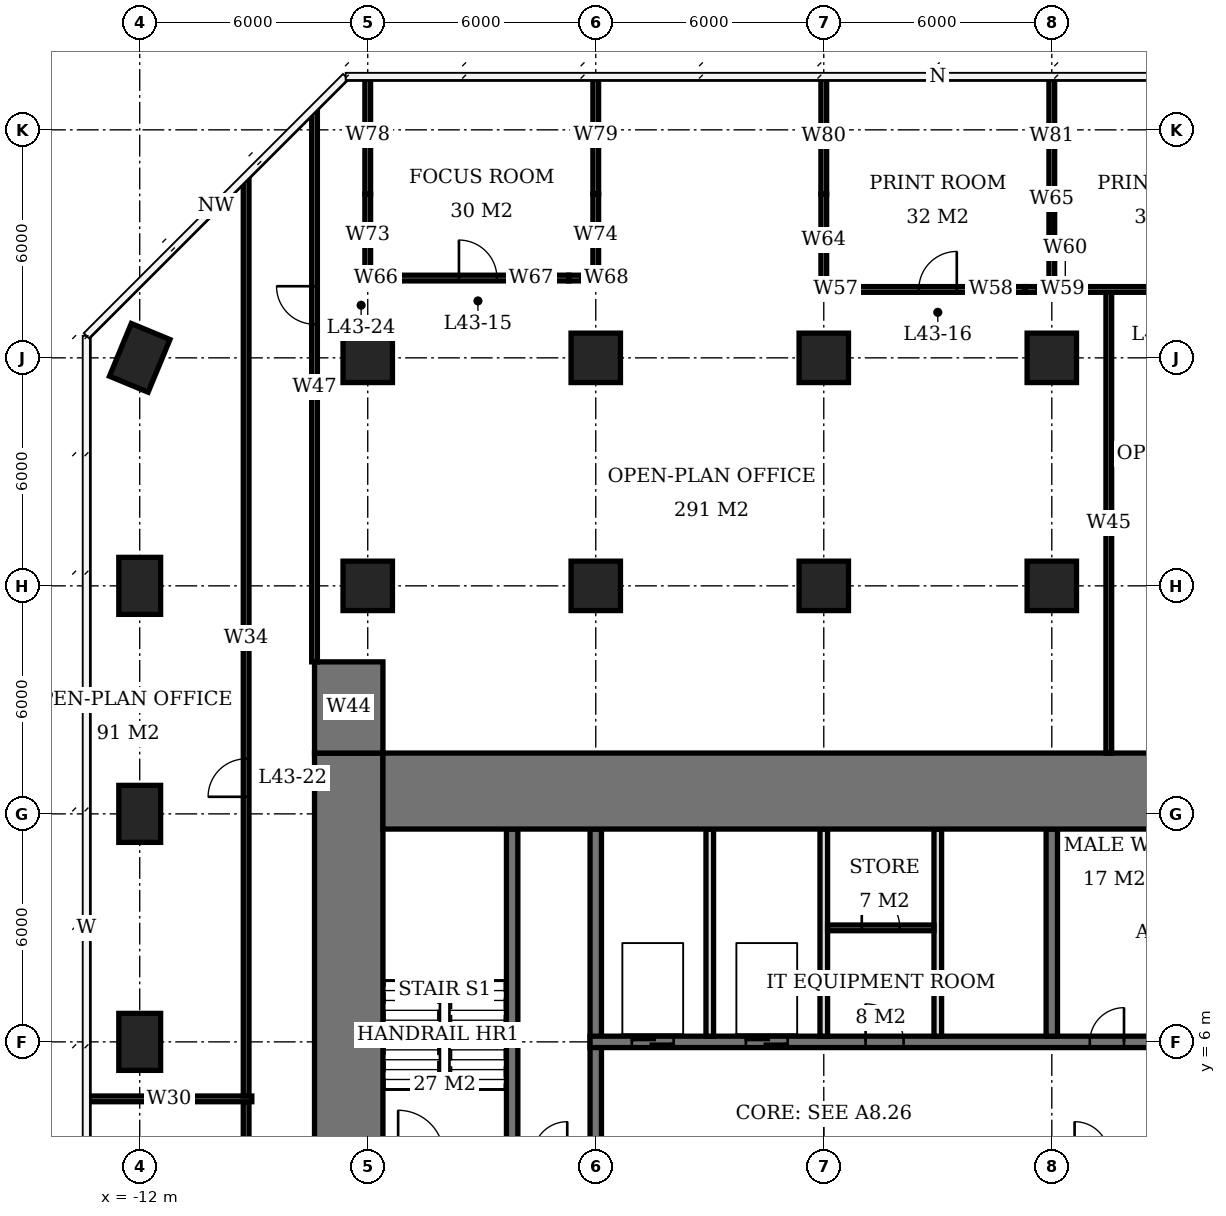
"""IFC4 building model, lengths in metres.
Left out: names, types, materials, properties, quantities, classifications, styles, units other than length and angle.
Written with IfcOpenShell. Run it as: python <this file> out.ifc"""

import sys

from ifc_helpers import new_model, si_unit, direction, frame, frame_2d, origin, origin_2d, place, context, subcontext, project, spatial, rectangle, extrude, element, fill, save


model = new_model("IFC4")
c1 = context("Model", 3, precision=1e-05, world=origin(), true_north=direction((0.0, 1.0)))
c2 = subcontext(c1, "Body", "Model", "MODEL_VIEW")
j1 = project(units=[si_unit("LENGTHUNIT", "METRE"), si_unit("PLANEANGLEUNIT", "RADIAN")], contexts=[c1])
p1 = place(None, origin())
s1 = spatial("IfcSite", under=j1, at=p1, CompositionType="ELEMENT")
p2 = place(p1, origin())
s2 = spatial("IfcBuilding", under=s1, at=p2, CompositionType="ELEMENT")
p3 = place(p2, frame((0.0, 0.0, 177.2)))
s3 = spatial("IfcBuildingStorey", under=s2, at=p3, CompositionType="ELEMENT", Elevation=177.2)
for number, where, z_axis, x_axis in (
    (1, (-12.0, 6.0, 0.0), (0.0, 0.0, 1.0), (0.0, 1.0, 0.0)),
    (2, (-12.0, 12.0, 0.0), (0.0, 0.0, 1.0), (0.0, 1.0, 0.0)),
    (3, (-12.0, 18.0, 0.0), (0.0, 0.0, 1.0), (0.0, 1.0, 0.0)),
    (4, (-12.0, 24.0, 0.0), (0.0, 0.0, 1.0), (0.383, 0.924, 0.0)),
):
    element("IfcColumn", number, at=place(p3, frame(where, z_axis=z_axis, x_axis=x_axis)), inside=s3, PredefinedType="COLUMN", context=c2, shape_type="SweptSolid", body=[
        extrude(rectangle(XDim=1.5, YDim=1.1, at=origin_2d()), origin(), (0.0, 0.0, 1.0), 3.9),
    ])
for number, where, z_axis, x_axis in (
    (5, (-6.0, 18.0, 0.0), (0.0, 0.0, 1.0), (1.0, 0.0, 0.0)),
    (6, (-6.0, 24.0, 0.0), (0.0, 0.0, 1.0), (1.0, 0.0, 0.0)),
    (7, (0.0, 18.0, 0.0), (0.0, 0.0, 1.0), (1.0, 0.0, 0.0)),
    (8, (0.0, 24.0, 0.0), (0.0, 0.0, 1.0), (1.0, 0.0, 0.0)),
    (9, (6.0, 18.0, 0.0), (0.0, 0.0, 1.0), (1.0, 0.0, 0.0)),
    (10, (6.0, 24.0, 0.0), (0.0, 0.0, 1.0), (1.0, 0.0, 0.0)),
    (11, (12.0, 18.0, 0.0), (0.0, 0.0, 1.0), (1.0, 0.0, 0.0)),
    (12, (12.0, 24.0, 0.0), (0.0, 0.0, 1.0), (1.0, 0.0, 0.0)),
):
    element("IfcColumn", number, at=place(p3, frame(where, z_axis=z_axis, x_axis=x_axis)), inside=s3, PredefinedType="COLUMN", context=c2, shape_type="SweptSolid", body=[
        extrude(rectangle(XDim=1.3, YDim=1.3, at=origin_2d()), origin(), (0.0, 0.0, 1.0), 3.9),
    ])
p4 = place(p3, frame((-5.6, 12.6, 0.0), z_axis=(0.0, 0.0, 1.0), x_axis=(1.0, 0.0, 0.0)))
e13 = element("IfcWall", 13, at=p4, inside=s3, PredefinedType="SHEAR", context=c2, shape_type="SweptSolid", body=[
    extrude(rectangle(XDim=23.2, YDim=2.0, at=frame_2d((11.6, 0.0))), origin(), (0.0, 0.0, 1.0), 3.9),
])
p5 = place(p3, frame((-6.5, -7.6, 0.0), z_axis=(0.0, 0.0, 1.0), x_axis=(0.0, 1.0, 0.0)))
e14 = element("IfcWall", 14, at=p5, inside=s3, PredefinedType="SHEAR", context=c2, shape_type="SweptSolid", body=[
    extrude(rectangle(XDim=21.2, YDim=1.8, at=frame_2d((10.6, 0.0))), origin(), (0.0, 0.0, 1.0), 3.9),
])
p6 = place(p5, frame((7.8, 0.0, 0.0)))
e15 = element("IfcOpeningElement", 15, at=p6, cuts=e14, PredefinedType="OPENING", context=c2, shape_type="SweptSolid", body=[
    extrude(rectangle(XDim=1.8, YDim=2.4, at=frame_2d((0.9, 1.2))), frame((0.0, 0.91, 0.0), z_axis=(0.0, -1.0, 0.0), x_axis=(1.0, 0.0, 0.0)), (0.0, 0.0, 1.0), 1.82),
])
p7 = place(p3, frame((-6.5, 13.6, 0.0), z_axis=(0.0, 0.0, 1.0), x_axis=(0.0, 1.0, 0.0)))
e16 = element("IfcWall", 16, at=p7, inside=s3, PredefinedType="SHEAR", context=c2, shape_type="SweptSolid", body=[
    extrude(rectangle(XDim=2.4, YDim=1.8, at=frame_2d((1.2, 0.0))), origin(), (0.0, 0.0, 1.0), 3.9),
])
p8 = place(p3, frame((-0.15, 6.0, 0.0), z_axis=(0.0, 0.0, 1.0), x_axis=(1.0, 0.0, 0.0)))
e17 = element("IfcWall", 17, at=p8, inside=s3, PredefinedType="SHEAR", context=c2, shape_type="SweptSolid", body=[
    extrude(rectangle(XDim=17.75, YDim=0.3, at=frame_2d((8.875, 0.0))), origin(), (0.0, 0.0, 1.0), 3.9),
])
p9 = place(p8, frame((13.15, 0.0, 0.0)))
e18 = element("IfcOpeningElement", 18, at=p9, cuts=e17, PredefinedType="OPENING", context=c2, shape_type="SweptSolid", body=[
    extrude(rectangle(XDim=0.9, YDim=2.1, at=frame_2d((0.45, 1.05))), frame((0.0, 0.16, 0.0), z_axis=(0.0, -1.0, 0.0), x_axis=(1.0, 0.0, 0.0)), (0.0, 0.0, 1.0), 0.32),
])
p10 = place(p8, frame((16.25, 0.0, 0.0)))
e19 = element("IfcOpeningElement", 19, at=p10, cuts=e17, PredefinedType="OPENING", context=c2, shape_type="SweptSolid", body=[
    extrude(rectangle(XDim=1.0, YDim=2.1, at=frame_2d((0.5, 1.05))), frame((0.0, 0.16, 0.0), z_axis=(0.0, -1.0, 0.0), x_axis=(1.0, 0.0, 0.0)), (0.0, 0.0, 1.0), 0.32),
])
p11 = place(p8, frame((7.25, 0.0, 0.0)))
e20 = element("IfcOpeningElement", 20, at=p11, cuts=e17, PredefinedType="OPENING", context=c2, shape_type="SweptSolid", body=[
    extrude(rectangle(XDim=1.0, YDim=2.1, at=frame_2d((0.5, 1.05))), frame((0.0, 0.16, 0.0), z_axis=(0.0, -1.0, 0.0), x_axis=(1.0, 0.0, 0.0)), (0.0, 0.0, 1.0), 0.32),
])
p12 = place(p8, frame((1.1, 0.0, 0.0)))
e21 = element("IfcOpeningElement", 21, at=p12, cuts=e17, PredefinedType="OPENING", context=c2, shape_type="SweptSolid", body=[
    extrude(rectangle(XDim=1.1, YDim=2.1, at=frame_2d((0.55, 1.05))), frame((0.0, 0.16, 0.0), z_axis=(0.0, -1.0, 0.0), x_axis=(1.0, 0.0, 0.0)), (0.0, 0.0, 1.0), 0.32),
])
p13 = place(p8, frame((4.1, 0.0, 0.0)))
e22 = element("IfcOpeningElement", 22, at=p13, cuts=e17, PredefinedType="OPENING", context=c2, shape_type="SweptSolid", body=[
    extrude(rectangle(XDim=1.1, YDim=2.1, at=frame_2d((0.55, 1.05))), frame((0.0, 0.16, 0.0), z_axis=(0.0, -1.0, 0.0), x_axis=(1.0, 0.0, 0.0)), (0.0, 0.0, 1.0), 0.32),
])
p14 = place(p3, frame((0.0, 3.15, 0.0), z_axis=(0.0, 0.0, 1.0), x_axis=(0.0, 1.0, 0.0)))
e23 = element("IfcWall", 23, at=p14, inside=s3, PredefinedType="SHEAR", context=c2, shape_type="SweptSolid", body=[
    extrude(rectangle(XDim=8.45, YDim=0.3, at=frame_2d((4.225, 0.0))), origin(), (0.0, 0.0, 1.0), 3.9),
])
p15 = place(p3, frame((12.0, 6.15, 0.0), z_axis=(0.0, 0.0, 1.0), x_axis=(0.0, 1.0, 0.0)))
e24 = element("IfcWall", 24, at=p15, inside=s3, PredefinedType="SHEAR", context=c2, shape_type="SweptSolid", body=[
    extrude(rectangle(XDim=5.45, YDim=0.3, at=frame_2d((2.725, 0.0))), origin(), (0.0, 0.0, 1.0), 3.9),
])
p16 = place(p3, frame((-2.2, 3.15, 0.0), z_axis=(0.0, 0.0, 1.0), x_axis=(0.0, 1.0, 0.0)))
e25 = element("IfcWall", 25, at=p16, inside=s3, PredefinedType="SHEAR", context=c2, shape_type="SweptSolid", body=[
    extrude(rectangle(XDim=8.45, YDim=0.3, at=frame_2d((4.225, 0.0))), origin(), (0.0, 0.0, 1.0), 3.9),
])
for number, where, z_axis, x_axis in (
    (26, (3.0, 6.15, 0.0), (0.0, 0.0, 1.0), (0.0, 1.0, 0.0)),
    (27, (6.0, 6.15, 0.0), (0.0, 0.0, 1.0), (0.0, 1.0, 0.0)),
    (28, (9.0, 6.15, 0.0), (0.0, 0.0, 1.0), (0.0, 1.0, 0.0)),
):
    element("IfcWall", number, at=place(p3, frame(where, z_axis=z_axis, x_axis=x_axis)), inside=s3, PredefinedType="SOLIDWALL", context=c2, shape_type="SweptSolid", body=[
        extrude(rectangle(XDim=5.45, YDim=0.2, at=frame_2d((2.725, 0.0))), origin(), (0.0, 0.0, 1.0), 3.9),
    ])
p17 = place(p3, frame((6.1, 9.0, 0.0), z_axis=(0.0, 0.0, 1.0), x_axis=(1.0, 0.0, 0.0)))
e29 = element("IfcWall", 29, at=p17, inside=s3, PredefinedType="PARTITIONING", context=c2, shape_type="SweptSolid", body=[
    extrude(rectangle(XDim=2.8, YDim=0.15, at=frame_2d((1.4, 0.0))), origin(), (0.0, 0.0, 1.0), 3.65),
])
p18 = place(p17, frame((0.9, 0.0, 0.0)))
e30 = element("IfcOpeningElement", 30, at=p18, cuts=e29, PredefinedType="OPENING", context=c2, shape_type="SweptSolid", body=[
    extrude(rectangle(XDim=1.0, YDim=2.1, at=frame_2d((0.5, 1.05))), frame((0.0, 0.085, 0.0), z_axis=(0.0, -1.0, 0.0), x_axis=(1.0, 0.0, 0.0)), (0.0, 0.0, 1.0), 0.17),
])
p19 = place(p3, frame((5.925, 25.8, 0.0), z_axis=(0.0, 0.0, 1.0), x_axis=(1.0, 0.0, 0.0)))
e31 = element("IfcWall", 31, at=p19, inside=s3, PredefinedType="PARTITIONING", context=c2, shape_type="SweptSolid", body=[
    extrude(rectangle(XDim=0.785, YDim=0.15, at=frame_2d((0.393, 0.0))), origin(), (0.0, 0.0, 1.0), 2.65),
])
p20 = place(p3, frame((6.71, 25.8, 0.0), z_axis=(0.0, 0.0, 1.0), x_axis=(1.0, 0.0, 0.0)))
e32 = element("IfcWall", 32, at=p20, inside=s3, PredefinedType="PARTITIONING", context=c2, shape_type="SweptSolid", body=[
    extrude(rectangle(XDim=4.58, YDim=0.15, at=frame_2d((2.29, 0.0))), origin(), (0.0, 0.0, 1.0), 3.65),
])
p21 = place(p20, frame((1.79, 0.0, 0.0)))
e33 = element("IfcOpeningElement", 33, at=p21, cuts=e32, PredefinedType="OPENING", context=c2, shape_type="SweptSolid", body=[
    extrude(rectangle(XDim=1.0, YDim=2.1, at=frame_2d((0.5, 1.05))), frame((0.0, 0.085, 0.0), z_axis=(0.0, -1.0, 0.0), x_axis=(1.0, 0.0, 0.0)), (0.0, 0.0, 1.0), 0.17),
])
p22 = place(p3, frame((11.29, 25.8, 0.0), z_axis=(0.0, 0.0, 1.0), x_axis=(1.0, 0.0, 0.0)))
e34 = element("IfcWall", 34, at=p22, inside=s3, PredefinedType="PARTITIONING", context=c2, shape_type="SweptSolid", body=[
    extrude(rectangle(XDim=0.785, YDim=0.15, at=frame_2d((0.393, 0.0))), origin(), (0.0, 0.0, 1.0), 2.65),
])
p23 = place(p3, frame((12.0, 25.8, 0.0), z_axis=(0.0, 0.0, 1.0), x_axis=(1.0, 0.0, 0.0)))
e35 = element("IfcWall", 35, at=p23, inside=s3, PredefinedType="PARTITIONING", context=c2, shape_type="SweptSolid", body=[
    extrude(rectangle(XDim=0.71, YDim=0.15, at=frame_2d((0.355, 0.0))), origin(), (0.0, 0.0, 1.0), 2.65),
])
p24 = place(p3, frame((12.71, 25.8, 0.0), z_axis=(0.0, 0.0, 1.0), x_axis=(1.0, 0.0, 0.0)))
e36 = element("IfcWall", 36, at=p24, inside=s3, PredefinedType="PARTITIONING", context=c2, shape_type="SweptSolid", body=[
    extrude(rectangle(XDim=4.58, YDim=0.15, at=frame_2d((2.29, 0.0))), origin(), (0.0, 0.0, 1.0), 3.65),
])
p25 = place(p24, frame((1.79, 0.0, 0.0)))
e37 = element("IfcOpeningElement", 37, at=p25, cuts=e36, PredefinedType="OPENING", context=c2, shape_type="SweptSolid", body=[
    extrude(rectangle(XDim=1.0, YDim=2.1, at=frame_2d((0.5, 1.05))), frame((0.0, 0.085, 0.0), z_axis=(0.0, -1.0, 0.0), x_axis=(1.0, 0.0, 0.0)), (0.0, 0.0, 1.0), 0.17),
])
p26 = place(p3, frame((-6.075, 26.1, 0.0), z_axis=(0.0, 0.0, 1.0), x_axis=(1.0, 0.0, 0.0)))
e38 = element("IfcWall", 38, at=p26, inside=s3, PredefinedType="PARTITIONING", context=c2, shape_type="SweptSolid", body=[
    extrude(rectangle(XDim=0.585, YDim=0.15, at=frame_2d((0.292, 0.0))), origin(), (0.0, 0.0, 1.0), 2.65),
])
p27 = place(p3, frame((-5.49, 26.1, 0.0), z_axis=(0.0, 0.0, 1.0), x_axis=(1.0, 0.0, 0.0)))
e39 = element("IfcWall", 39, at=p27, inside=s3, PredefinedType="PARTITIONING", context=c2, shape_type="SweptSolid", body=[
    extrude(rectangle(XDim=4.78, YDim=0.15, at=frame_2d((2.39, 0.0))), origin(), (0.0, 0.0, 1.0), 3.65),
])
p28 = place(p27, frame((1.89, 0.0, 0.0)))
e40 = element("IfcOpeningElement", 40, at=p28, cuts=e39, PredefinedType="OPENING", context=c2, shape_type="SweptSolid", body=[
    extrude(rectangle(XDim=1.0, YDim=2.1, at=frame_2d((0.5, 1.05))), frame((0.0, 0.085, 0.0), z_axis=(0.0, -1.0, 0.0), x_axis=(1.0, 0.0, 0.0)), (0.0, 0.0, 1.0), 0.17),
])
p29 = place(p3, frame((-0.71, 26.1, 0.0), z_axis=(0.0, 0.0, 1.0), x_axis=(1.0, 0.0, 0.0)))
e41 = element("IfcWall", 41, at=p29, inside=s3, PredefinedType="PARTITIONING", context=c2, shape_type="SweptSolid", body=[
    extrude(rectangle(XDim=0.785, YDim=0.15, at=frame_2d((0.393, 0.0))), origin(), (0.0, 0.0, 1.0), 2.65),
])
p30 = place(p3, frame((-6.0, 26.175, 0.0), z_axis=(0.0, 0.0, 1.0), x_axis=(0.0, 1.0, 0.0)))
e42 = element("IfcWall", 42, at=p30, inside=s3, PredefinedType="PARTITIONING", context=c2, shape_type="SweptSolid", body=[
    extrude(rectangle(XDim=2.135, YDim=0.15, at=frame_2d((1.067, 0.0))), origin(), (0.0, 0.0, 1.0), 2.65),
])
p31 = place(p3, frame((-6.0, 28.31, 0.0), z_axis=(0.0, 0.0, 1.0), x_axis=(0.0, 1.0, 0.0)))
e43 = element("IfcWall", 43, at=p31, inside=s3, PredefinedType="PARTITIONING", context=c2, shape_type="SweptSolid", body=[
    extrude(rectangle(XDim=3.09, YDim=0.15, at=frame_2d((1.545, 0.0))), origin(), (0.0, 0.0, 1.0), 3.65),
])
p32 = place(p3, frame((0.0, 26.175, 0.0), z_axis=(0.0, 0.0, 1.0), x_axis=(0.0, 1.0, 0.0)))
e44 = element("IfcWall", 44, at=p32, inside=s3, PredefinedType="PARTITIONING", context=c2, shape_type="SweptSolid", body=[
    extrude(rectangle(XDim=2.135, YDim=0.15, at=frame_2d((1.067, 0.0))), origin(), (0.0, 0.0, 1.0), 2.65),
])
p33 = place(p3, frame((0.0, 28.31, 0.0), z_axis=(0.0, 0.0, 1.0), x_axis=(0.0, 1.0, 0.0)))
e45 = element("IfcWall", 45, at=p33, inside=s3, PredefinedType="PARTITIONING", context=c2, shape_type="SweptSolid", body=[
    extrude(rectangle(XDim=3.09, YDim=0.15, at=frame_2d((1.545, 0.0))), origin(), (0.0, 0.0, 1.0), 3.65),
])
p34 = place(p3, frame((6.0, 25.875, 0.0), z_axis=(0.0, 0.0, 1.0), x_axis=(0.0, 1.0, 0.0)))
e46 = element("IfcWall", 46, at=p34, inside=s3, PredefinedType="PARTITIONING", context=c2, shape_type="SweptSolid", body=[
    extrude(rectangle(XDim=2.435, YDim=0.15, at=frame_2d((1.218, 0.0))), origin(), (0.0, 0.0, 1.0), 2.65),
])
p35 = place(p3, frame((6.0, 28.31, 0.0), z_axis=(0.0, 0.0, 1.0), x_axis=(0.0, 1.0, 0.0)))
e47 = element("IfcWall", 47, at=p35, inside=s3, PredefinedType="PARTITIONING", context=c2, shape_type="SweptSolid", body=[
    extrude(rectangle(XDim=3.04, YDim=0.15, at=frame_2d((1.52, 0.0))), origin(), (0.0, 0.0, 1.0), 3.65),
])
p36 = place(p3, frame((12.0, 25.875, 0.0), z_axis=(0.0, 0.0, 1.0), x_axis=(0.0, 1.0, 0.0)))
e48 = element("IfcWall", 48, at=p36, inside=s3, PredefinedType="PARTITIONING", context=c2, shape_type="SweptSolid", body=[
    extrude(rectangle(XDim=2.435, YDim=0.15, at=frame_2d((1.218, 0.0))), origin(), (0.0, 0.0, 1.0), 2.65),
])
p37 = place(p3, frame((12.0, 28.31, 0.0), z_axis=(0.0, 0.0, 1.0), x_axis=(0.0, 1.0, 0.0)))
e49 = element("IfcWall", 49, at=p37, inside=s3, PredefinedType="PARTITIONING", context=c2, shape_type="SweptSolid", body=[
    extrude(rectangle(XDim=3.04, YDim=0.15, at=frame_2d((1.52, 0.0))), origin(), (0.0, 0.0, 1.0), 3.65),
])
p38 = place(p3, frame((-13.4, 4.5, 0.0), z_axis=(0.0, 0.0, 1.0), x_axis=(1.0, 0.0, 0.0)))
e50 = element("IfcWall", 50, at=p38, inside=s3, PredefinedType="PARTITIONING", context=c2, shape_type="SweptSolid", body=[
    extrude(rectangle(XDim=4.35, YDim=0.15, at=frame_2d((2.175, 0.0))), origin(), (0.0, 0.0, 1.0), 3.65),
])
p39 = place(p3, frame((-9.2, -10.689, 0.0), z_axis=(0.0, 0.0, 1.0), x_axis=(0.0, 1.0, 0.0)))
e51 = element("IfcWall", 51, at=p39, inside=s3, PredefinedType="PARTITIONING", context=c2, shape_type="SweptSolid", body=[
    extrude(rectangle(XDim=15.114, YDim=0.15, at=frame_2d((7.557, 0.0))), origin(), (0.0, 0.0, 1.0), 3.65),
])
p40 = place(p39, frame((4.849, 0.0, 0.0)))
e52 = element("IfcOpeningElement", 52, at=p40, cuts=e51, PredefinedType="OPENING", context=c2, shape_type="SweptSolid", body=[
    extrude(rectangle(XDim=1.0, YDim=2.1, at=frame_2d((0.5, 1.05))), frame((0.0, 0.085, 0.0), z_axis=(0.0, -1.0, 0.0), x_axis=(1.0, 0.0, 0.0)), (0.0, 0.0, 1.0), 0.17),
])
p41 = place(p3, frame((-9.2, 4.575, 0.0), z_axis=(0.0, 0.0, 1.0), x_axis=(0.0, 1.0, 0.0)))
e53 = element("IfcWall", 53, at=p41, inside=s3, PredefinedType="PARTITIONING", context=c2, shape_type="SweptSolid", body=[
    extrude(rectangle(XDim=24.114, YDim=0.15, at=frame_2d((12.057, 0.0))), origin(), (0.0, 0.0, 1.0), 3.65),
])
p42 = place(p41, frame((7.874, 0.0, 0.0)))
e54 = element("IfcOpeningElement", 54, at=p42, cuts=e53, PredefinedType="OPENING", context=c2, shape_type="SweptSolid", body=[
    extrude(rectangle(XDim=1.0, YDim=2.1, at=frame_2d((0.5, 1.05))), frame((0.0, 0.085, 0.0), z_axis=(0.0, -1.0, 0.0), x_axis=(1.0, 0.0, 0.0)), (0.0, 0.0, 1.0), 0.17),
])
p43 = place(p3, frame((-7.4, 16.0, 0.0), z_axis=(0.0, 0.0, 1.0), x_axis=(0.0, 1.0, 0.0)))
e55 = element("IfcWall", 55, at=p43, inside=s3, PredefinedType="PARTITIONING", context=c2, shape_type="SweptSolid", body=[
    extrude(rectangle(XDim=14.489, YDim=0.15, at=frame_2d((7.245, 0.0))), origin(), (0.0, 0.0, 1.0), 3.65),
])
p44 = place(p43, frame((8.885, 0.0, 0.0)))
e56 = element("IfcOpeningElement", 56, at=p44, cuts=e55, PredefinedType="OPENING", context=c2, shape_type="SweptSolid", body=[
    extrude(rectangle(XDim=1.0, YDim=2.1, at=frame_2d((0.5, 1.05))), frame((0.0, 0.085, 0.0), z_axis=(0.0, -1.0, 0.0), x_axis=(1.0, 0.0, 0.0)), (0.0, 0.0, 1.0), 0.17),
])
p45 = place(p3, frame((13.5, 13.6, 0.0), z_axis=(0.0, 0.0, 1.0), x_axis=(0.0, 1.0, 0.0)))
e57 = element("IfcWall", 57, at=p45, inside=s3, PredefinedType="PARTITIONING", context=c2, shape_type="SweptSolid", body=[
    extrude(rectangle(XDim=12.125, YDim=0.15, at=frame_2d((6.062, 0.0))), origin(), (0.0, 0.0, 1.0), 3.65),
])
p46 = place(p9, origin())
e58 = element("IfcDoor", 58, at=p46, inside=s3, OperationType="SINGLE_SWING_RIGHT", PredefinedType="DOOR", context=c2, shape_type="SweptSolid", body=[
    extrude(rectangle(XDim=0.9, YDim=2.1, at=frame_2d((0.45, 1.05))), frame((0.0, 0.025, 0.0), z_axis=(0.0, -1.0, 0.0), x_axis=(1.0, 0.0, 0.0)), (0.0, 0.0, 1.0), 0.05),
])
fill(e18, e58)
p47 = place(p18, origin())
e59 = element("IfcDoor", 59, at=p47, inside=s3, OperationType="SINGLE_SWING_LEFT", PredefinedType="DOOR", context=c2, shape_type="SweptSolid", body=[
    extrude(rectangle(XDim=1.0, YDim=2.1, at=frame_2d((0.5, 1.05))), frame((0.0, 0.025, 0.0), z_axis=(0.0, -1.0, 0.0), x_axis=(1.0, 0.0, 0.0)), (0.0, 0.0, 1.0), 0.05),
])
fill(e30, e59)
p48 = place(p11, origin())
e60 = element("IfcDoor", 60, at=p48, inside=s3, OperationType="SINGLE_SWING_LEFT", PredefinedType="DOOR", context=c2, shape_type="SweptSolid", body=[
    extrude(rectangle(XDim=1.0, YDim=2.1, at=frame_2d((0.5, 1.05))), frame((0.0, 0.025, 0.0), z_axis=(0.0, -1.0, 0.0), x_axis=(1.0, 0.0, 0.0)), (0.0, 0.0, 1.0), 0.05),
])
fill(e20, e60)
p49 = place(p12, origin())
e61 = element("IfcDoor", 61, at=p49, inside=s3, OperationType="DOUBLE_DOOR_SLIDING", PredefinedType="USERDEFINED", context=c2, shape_type="SweptSolid", body=[
    extrude(rectangle(XDim=1.1, YDim=2.1, at=frame_2d((0.55, 1.05))), frame((0.0, 0.025, 0.0), z_axis=(0.0, -1.0, 0.0), x_axis=(1.0, 0.0, 0.0)), (0.0, 0.0, 1.0), 0.05),
])
fill(e21, e61)
p50 = place(p13, origin())
e62 = element("IfcDoor", 62, at=p50, inside=s3, OperationType="DOUBLE_DOOR_SLIDING", PredefinedType="USERDEFINED", context=c2, shape_type="SweptSolid", body=[
    extrude(rectangle(XDim=1.1, YDim=2.1, at=frame_2d((0.55, 1.05))), frame((0.0, 0.025, 0.0), z_axis=(0.0, -1.0, 0.0), x_axis=(1.0, 0.0, 0.0)), (0.0, 0.0, 1.0), 0.05),
])
fill(e22, e62)
p51 = place(p28, origin())
e63 = element("IfcDoor", 63, at=p51, inside=s3, OperationType="SINGLE_SWING_LEFT", PredefinedType="DOOR", context=c2, shape_type="SweptSolid", body=[
    extrude(rectangle(XDim=1.0, YDim=2.1, at=frame_2d((0.5, 1.05))), frame((0.0, 0.025, 0.0), z_axis=(0.0, -1.0, 0.0), x_axis=(1.0, 0.0, 0.0)), (0.0, 0.0, 1.0), 0.05),
])
fill(e40, e63)
p52 = place(p21, origin())
e64 = element("IfcDoor", 64, at=p52, inside=s3, OperationType="SINGLE_SWING_RIGHT", PredefinedType="DOOR", context=c2, shape_type="SweptSolid", body=[
    extrude(rectangle(XDim=1.0, YDim=2.1, at=frame_2d((0.5, 1.05))), frame((0.0, 0.025, 0.0), z_axis=(0.0, -1.0, 0.0), x_axis=(1.0, 0.0, 0.0)), (0.0, 0.0, 1.0), 0.05),
])
fill(e33, e64)
p53 = place(p42, origin())
e65 = element("IfcDoor", 65, at=p53, inside=s3, OperationType="SINGLE_SWING_LEFT", PredefinedType="DOOR", context=c2, shape_type="SweptSolid", body=[
    extrude(rectangle(XDim=1.0, YDim=2.1, at=frame_2d((0.5, 1.05))), frame((0.0, 0.025, 0.0), z_axis=(0.0, -1.0, 0.0), x_axis=(1.0, 0.0, 0.0)), (0.0, 0.0, 1.0), 0.05),
])
fill(e54, e65)
p54 = place(p44, origin())
e66 = element("IfcDoor", 66, at=p54, inside=s3, OperationType="SINGLE_SWING_RIGHT", PredefinedType="DOOR", context=c2, shape_type="SweptSolid", body=[
    extrude(rectangle(XDim=1.0, YDim=2.1, at=frame_2d((0.5, 1.05))), frame((0.0, 0.025, 0.0), z_axis=(0.0, -1.0, 0.0), x_axis=(1.0, 0.0, 0.0)), (0.0, 0.0, 1.0), 0.05),
])
fill(e56, e66)
save(model, sys.argv[1])
